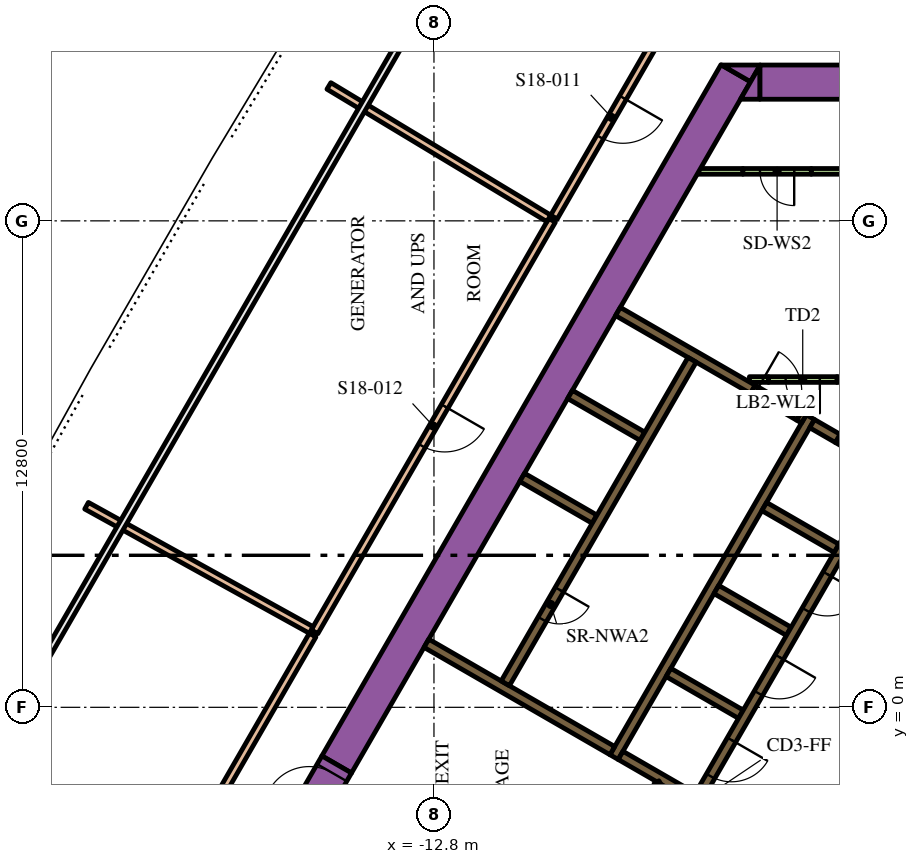
"""IFC4 building model, lengths in metres.
Left out: names, types, materials, properties, quantities, classifications, styles, units other than length and angle.
Written with IfcOpenShell. Run it as: python <this file> out.ifc"""

import sys

from ifc_helpers import new_model, si_unit, direction, frame, frame_2d, origin, place, context, subcontext, project, spatial, polyline, rectangle, outline, extrude, element, fill, save


model = new_model("IFC4")
c1 = context("Model", 3, precision=1e-05, world=origin(), true_north=direction((0.0, 1.0)))
c2 = subcontext(c1, "Body", "Model", "MODEL_VIEW")
j1 = project(units=[si_unit("LENGTHUNIT", "METRE"), si_unit("PLANEANGLEUNIT", "RADIAN")], contexts=[c1])
p1 = place(None, origin())
s1 = spatial("IfcSite", under=j1, at=p1, CompositionType="ELEMENT")
p2 = place(p1, origin())
s2 = spatial("IfcBuilding", under=s1, at=p2, CompositionType="ELEMENT")
p3 = place(p2, frame((0.0, 0.0, 78.3)))
s3 = spatial("IfcBuildingStorey", under=s2, at=p3, CompositionType="ELEMENT", Elevation=78.3)
p4 = place(p3, frame((-15.36, -1.503, 0.0), z_axis=(0.0, 0.0, 1.0), x_axis=(0.50000389221, 0.866023156604, 0.0)))
e1 = element("IfcWall", 1, at=p4, inside=s3, PredefinedType="SOLIDWALL", context=c2, shape_type="SweptSolid", body=[
    extrude(rectangle(XDim=21.0, YDim=0.9, at=frame_2d((10.5, 0.0))), origin(), (0.0, 0.0, 1.0), 5.4),
])
p5 = place(p3, origin())
e2 = element("IfcWall", 2, at=p5, inside=s3, PredefinedType="SOLIDWALL", context=c2, shape_type="SweptSolid", body=[
    extrude(outline(polyline([(-4.215, 16.9), (-4.469, 16.46), (-5.231, 16.9), (-4.215, 16.9)])), origin(), (0.0, 0.0, 1.0), 5.4),
])
p6 = place(p3, frame((-4.224, 16.45, 0.0), z_axis=(0.0, 0.0, 1.0), x_axis=(1.0, 0.0, 0.0)))
e3 = element("IfcWall", 3, at=p6, inside=s3, PredefinedType="SOLIDWALL", context=c2, shape_type="SweptSolid", body=[
    extrude(rectangle(XDim=9.488, YDim=0.9, at=frame_2d((4.744, 0.0))), origin(), (0.0, 0.0, 1.0), 5.4),
])
e4 = element("IfcWall", 4, at=p5, inside=s3, PredefinedType="SOLIDWALL", context=c2, shape_type="SweptSolid", body=[
    extrude(outline(polyline([(-4.734, 16.0), (-4.226, 16.88), (-4.226, 16.0), (-4.734, 16.0)])), origin(), (0.0, 0.0, 1.0), 5.4),
])
p7 = place(p3, frame((-8.06, -1.311, 0.0), z_axis=(0.0, 0.0, 1.0), x_axis=(0.50000273126, 0.866023826885, 0.0)))
e5 = element("IfcWall", 5, at=p7, inside=s3, PredefinedType="SOLIDWALL", context=c2, shape_type="SweptSolid", body=[
    extrude(rectangle(XDim=10.33, YDim=0.25, at=frame_2d((5.165, 0.0))), origin(), (0.0, 0.0, 1.0), 5.4),
])
p8 = place(p3, frame((-1.819, 6.87, 0.0), z_axis=(0.0, 0.0, 1.0), x_axis=(-0.866294599386, 0.499533449405, 0.0)))
e6 = element("IfcWall", 6, at=p8, inside=s3, PredefinedType="SOLIDWALL", context=c2, shape_type="SweptSolid", body=[
    extrude(rectangle(XDim=0.41, YDim=0.25, at=frame_2d((0.205, 0.0))), origin(), (0.0, 0.0, 1.0), 5.4),
])
p9 = place(p3, frame((-2.849, 7.465, 0.0), z_axis=(0.0, 0.0, 1.0), x_axis=(0.865955664968, -0.500120771724, 0.0)))
e7 = element("IfcWall", 7, at=p9, inside=s3, PredefinedType="SOLIDWALL", context=c2, shape_type="SweptSolid", body=[
    extrude(rectangle(XDim=0.778, YDim=0.25, at=frame_2d((0.389, 0.0))), origin(), (0.0, 0.0, 1.0), 5.4),
])
for number, where, z_axis, x_axis in (
    (8, (-2.204, 4.182, 0.0), (0.0, 0.0, 1.0), (-0.866, 0.5, 0.0)),
    (9, (-5.369, 3.1, 0.0), (0.0, 0.0, 1.0), (0.866, -0.5, 0.0)),
    (10, (-4.724, -0.182, 0.0), (0.0, 0.0, 1.0), (-0.866, 0.5, 0.0)),
):
    element("IfcWall", number, at=place(p3, frame(where, z_axis=z_axis, x_axis=x_axis)), inside=s3, PredefinedType="SOLIDWALL", context=c2, shape_type="SweptSolid", body=[
        extrude(rectangle(XDim=2.2, YDim=0.25, at=frame_2d((1.1, 0.0))), origin(), (0.0, 0.0, 1.0), 5.4),
    ])
e11 = element("IfcWall", 11, at=p5, inside=s3, PredefinedType="SOLIDWALL", context=c2, shape_type="SweptSolid", body=[
    extrude(outline(polyline([(-5.922, -2.257), (-5.922, -2.257), (-5.705, -2.382), (-5.83, -2.598), (-6.829, -2.021), (-6.88, -1.934), (-6.88, -1.934), (-6.93, -1.963), (-7.952, -1.373), (-7.827, -1.156), (-5.922, -2.257)])), origin(), (0.0, 0.0, 1.0), 5.4),
])
p10 = place(p3, frame((-8.106, -1.14, 0.0), z_axis=(0.0, 0.0, 1.0), x_axis=(-0.866000643155, 0.500042884217, 0.0)))
e12 = element("IfcWall", 12, at=p10, inside=s3, PredefinedType="SOLIDWALL", context=c2, shape_type="SweptSolid", body=[
    extrude(rectangle(XDim=5.65, YDim=0.25, at=frame_2d((2.825, 0.0))), origin(), (0.0, 0.0, 1.0), 5.4),
])
e13 = element("IfcWall", 13, at=p5, inside=s3, PredefinedType="SOLIDWALL", context=c2, shape_type="SweptSolid", body=[
    extrude(outline(polyline([(-3.128, 7.481), (-3.259, 7.557), (-3.134, 7.773), (-3.003, 7.698), (-3.128, 7.481)])), origin(), (0.0, 0.0, 1.0), 5.4),
])
for number, where, z_axis, x_axis in (
    (14, (-8.574, 4.95, 0.0), (0.0, 0.0, 1.0), (-0.866, 0.5, 0.0)),
    (15, (-7.314, 7.132, 0.0), (0.0, 0.0, 1.0), (-0.866, 0.5, 0.0)),
):
    element("IfcWall", number, at=place(p3, frame(where, z_axis=z_axis, x_axis=x_axis)), inside=s3, PredefinedType="SOLIDWALL", context=c2, shape_type="SweptSolid", body=[
        extrude(rectangle(XDim=2.2, YDim=0.25, at=frame_2d((1.1, 0.0))), origin(), (0.0, 0.0, 1.0), 5.4),
    ])
p11 = place(p3, frame((-7.959, 10.415, 0.0), z_axis=(0.0, 0.0, 1.0), x_axis=(0.866020958405, -0.500007699544, 0.0)))
e16 = element("IfcWall", 16, at=p11, inside=s3, PredefinedType="SOLIDWALL", context=c2, shape_type="SweptSolid", body=[
    extrude(rectangle(XDim=4.1, YDim=0.25, at=frame_2d((2.05, 0.0))), origin(), (0.0, 0.0, 1.0), 5.4),
])
p12 = place(p3, frame((-3.997, 8.625, 0.0), z_axis=(0.0, 0.0, 1.0), x_axis=(-1.0, 0.0, 0.0)))
e17 = element("IfcWall", 17, at=p12, inside=s3, PredefinedType="PARTITIONING", context=c2, shape_type="SweptSolid", body=[
    extrude(rectangle(XDim=0.502, YDim=0.15, at=frame_2d((0.251, 0.0))), origin(), (0.0, 0.0, 1.0), 4.25),
])
p13 = place(p3, frame((-5.851, 14.102, 0.0), z_axis=(0.0, 0.0, 1.0), x_axis=(1.0, 0.0, 0.0)))
e18 = element("IfcWall", 18, at=p13, inside=s3, PredefinedType="PARTITIONING", context=c2, shape_type="SweptSolid", body=[
    extrude(rectangle(XDim=1.18, YDim=0.15, at=frame_2d((0.59, 0.0))), origin(), (0.0, 0.0, 1.0), 4.25),
])
p14 = place(p3, frame((-2.871, 14.102, 0.0), z_axis=(0.0, 0.0, 1.0), x_axis=(1.0, 0.0, 0.0)))
e19 = element("IfcWall", 19, at=p14, inside=s3, PredefinedType="PARTITIONING", context=c2, shape_type="SweptSolid", body=[
    extrude(rectangle(XDim=1.196, YDim=0.15, at=frame_2d((0.598, 0.0))), origin(), (0.0, 0.0, 1.0), 4.25),
])
p15 = place(p3, frame((-2.196, 8.625, 0.0), z_axis=(0.0, 0.0, 1.0), x_axis=(1.0, 0.0, 0.0)))
e20 = element("IfcWall", 20, at=p15, inside=s3, PredefinedType="PARTITIONING", context=c2, shape_type="SweptSolid", body=[
    extrude(rectangle(XDim=1.146, YDim=0.15, at=frame_2d((0.573, 0.0))), origin(), (0.0, 0.0, 1.0), 4.25),
])
p16 = place(p3, frame((-6.008, 9.144, 0.0), z_axis=(0.0, 0.0, 1.0), x_axis=(-0.500006956611, -0.866021387346, 0.0)))
e21 = element("IfcWall", 21, at=p16, inside=s3, PredefinedType="SOLIDWALL", context=c2, shape_type="SweptSolid", body=[
    extrude(rectangle(XDim=9.83, YDim=0.25, at=frame_2d((4.915, 0.0))), origin(), (0.0, 0.0, 1.0), 5.4),
])
p17 = place(p16, frame((6.985, 0.0, 0.0)))
e22 = element("IfcOpeningElement", 22, at=p17, cuts=e21, PredefinedType="OPENING", context=c2, shape_type="SweptSolid", body=[
    extrude(rectangle(XDim=0.9, YDim=2.1, at=frame_2d((0.45, 1.05))), frame((0.0, 0.135, 0.0), z_axis=(0.0, -1.0, 0.0), x_axis=(1.0, 0.0, 0.0)), (0.0, 0.0, 1.0), 0.27),
])
p18 = place(p3, frame((-0.898, 6.194, 0.0), z_axis=(0.0, 0.0, 1.0), x_axis=(-0.499996202215, -0.866027596426, 0.0)))
e23 = element("IfcWall", 23, at=p18, inside=s3, PredefinedType="SOLIDWALL", context=c2, shape_type="SweptSolid", body=[
    extrude(rectangle(XDim=9.83, YDim=0.25, at=frame_2d((4.915, 0.0))), origin(), (0.0, 0.0, 1.0), 5.4),
])
p19 = place(p18, frame((0.585, 0.0, 0.0)))
e24 = element("IfcOpeningElement", 24, at=p19, cuts=e23, PredefinedType="OPENING", context=c2, shape_type="SweptSolid", body=[
    extrude(rectangle(XDim=1.1, YDim=2.1, at=frame_2d((0.55, 1.05))), frame((0.0, 0.135, 0.0), z_axis=(0.0, -1.0, 0.0), x_axis=(1.0, 0.0, 0.0)), (0.0, 0.0, 1.0), 0.27),
])
p20 = place(p18, frame((3.105, 0.0, 0.0)))
e25 = element("IfcOpeningElement", 25, at=p20, cuts=e23, PredefinedType="OPENING", context=c2, shape_type="SweptSolid", body=[
    extrude(rectangle(XDim=1.1, YDim=2.1, at=frame_2d((0.55, 1.05))), frame((0.0, 0.135, 0.0), z_axis=(0.0, -1.0, 0.0), x_axis=(1.0, 0.0, 0.0)), (0.0, 0.0, 1.0), 0.27),
])
p21 = place(p18, frame((5.625, 0.0, 0.0)))
e26 = element("IfcOpeningElement", 26, at=p21, cuts=e23, PredefinedType="OPENING", context=c2, shape_type="SweptSolid", body=[
    extrude(rectangle(XDim=1.1, YDim=2.1, at=frame_2d((0.55, 1.05))), frame((0.0, 0.135, 0.0), z_axis=(0.0, -1.0, 0.0), x_axis=(1.0, 0.0, 0.0)), (0.0, 0.0, 1.0), 0.27),
])
p22 = place(p18, frame((8.145, 0.0, 0.0)))
e27 = element("IfcOpeningElement", 27, at=p22, cuts=e23, PredefinedType="OPENING", context=c2, shape_type="SweptSolid", body=[
    extrude(rectangle(XDim=1.1, YDim=2.1, at=frame_2d((0.55, 1.05))), frame((0.0, 0.135, 0.0), z_axis=(0.0, -1.0, 0.0), x_axis=(1.0, 0.0, 0.0)), (0.0, 0.0, 1.0), 0.27),
])
p23 = place(p3, frame((-2.196, 8.625, 0.0), z_axis=(0.0, 0.0, 1.0), x_axis=(-1.0, 0.0, 0.0)))
e28 = element("IfcWall", 28, at=p23, inside=s3, PredefinedType="PARTITIONING", context=c2, shape_type="SweptSolid", body=[
    extrude(rectangle(XDim=1.8, YDim=0.15, at=frame_2d((0.9, 0.0))), origin(), (0.0, 0.0, 1.0), 4.25),
])
p24 = place(p23, frame((0.45, 0.0, 0.0)))
e29 = element("IfcOpeningElement", 29, at=p24, cuts=e28, PredefinedType="OPENING", context=c2, shape_type="SweptSolid", body=[
    extrude(rectangle(XDim=0.9, YDim=2.1, at=frame_2d((0.45, 1.05))), frame((0.0, 0.085, 0.0), z_axis=(0.0, -1.0, 0.0), x_axis=(1.0, 0.0, 0.0)), (0.0, 0.0, 1.0), 0.17),
])
p25 = place(p3, frame((-5.895, -3.79, 0.0), z_axis=(0.0, 0.0, 1.0), x_axis=(-0.49994051562, 0.866059744384, 0.0)))
e30 = element("IfcWall", 30, at=p25, inside=s3, PredefinedType="PARTITIONING", context=c2, shape_type="SweptSolid", body=[
    extrude(rectangle(XDim=2.1, YDim=0.15, at=frame_2d((1.05, 0.0))), origin(), (0.0, 0.0, 1.0), 4.25),
])
p26 = place(p25, frame((0.45, 0.0, 0.0)))
e31 = element("IfcOpeningElement", 31, at=p26, cuts=e30, PredefinedType="OPENING", context=c2, shape_type="SweptSolid", body=[
    extrude(rectangle(XDim=1.2, YDim=2.1, at=frame_2d((0.6, 1.05))), frame((0.0, 0.085, 0.0), z_axis=(0.0, -1.0, 0.0), x_axis=(1.0, 0.0, 0.0)), (0.0, 0.0, 1.0), 0.17),
])
p27 = place(p3, frame((-4.409, 8.365, 0.0), z_axis=(0.0, 0.0, 1.0), x_axis=(0.866034573852, -0.49998411664, 0.0)))
e32 = element("IfcWall", 32, at=p27, inside=s3, PredefinedType="SOLIDWALL", context=c2, shape_type="SweptSolid", body=[
    extrude(rectangle(XDim=1.4, YDim=0.25, at=frame_2d((0.7, 0.0))), origin(), (0.0, 0.0, 1.0), 5.4),
])
p28 = place(p27, frame((0.1, 0.0, 0.0)))
e33 = element("IfcOpeningElement", 33, at=p28, cuts=e32, PredefinedType="OPENING", context=c2, shape_type="SweptSolid", body=[
    extrude(rectangle(XDim=1.2, YDim=2.1, at=frame_2d((0.6, 1.05))), frame((0.0, 0.135, 0.0), z_axis=(0.0, -1.0, 0.0), x_axis=(1.0, 0.0, 0.0)), (0.0, 0.0, 1.0), 0.27),
])
p29 = place(p3, frame((-16.209, -2.976, 0.0), z_axis=(0.0, 0.0, 1.0), x_axis=(0.499954529098, 0.86605165483, 0.0)))
e34 = element("IfcWall", 34, at=p29, inside=s3, PredefinedType="SOLIDWALL", context=c2, shape_type="SweptSolid", body=[
    extrude(rectangle(XDim=1.7, YDim=0.9, at=frame_2d((0.85, 0.0))), origin(), (0.0, 0.0, 1.0), 5.4),
])
p30 = place(p29, frame((0.25, 0.0, 0.0)))
e35 = element("IfcOpeningElement", 35, at=p30, cuts=e34, PredefinedType="OPENING", context=c2, shape_type="SweptSolid", body=[
    extrude(rectangle(XDim=1.2, YDim=2.1, at=frame_2d((0.6, 1.05))), frame((0.0, 0.46, 0.0), z_axis=(0.0, -1.0, 0.0), x_axis=(1.0, 0.0, 0.0)), (0.0, 0.0, 1.0), 0.92),
])
p31 = place(p3, frame((-2.871, 14.102, 0.0), z_axis=(0.0, 0.0, 1.0), x_axis=(-1.0, 0.0, 0.0)))
e36 = element("IfcWall", 36, at=p31, inside=s3, PredefinedType="PARTITIONING", context=c2, shape_type="SweptSolid", body=[
    extrude(rectangle(XDim=1.8, YDim=0.15, at=frame_2d((0.9, 0.0))), origin(), (0.0, 0.0, 1.0), 4.25),
])
p32 = place(p31, frame((0.45, 0.0, 0.0)))
e37 = element("IfcOpeningElement", 37, at=p32, cuts=e36, PredefinedType="OPENING", context=c2, shape_type="SweptSolid", body=[
    extrude(rectangle(XDim=0.9, YDim=2.1, at=frame_2d((0.45, 1.05))), frame((0.0, 0.085, 0.0), z_axis=(0.0, -1.0, 0.0), x_axis=(1.0, 0.0, 0.0)), (0.0, 0.0, 1.0), 0.17),
])
p33 = place(p3, frame((-9.692, 12.813, 0.0), z_axis=(0.0, 0.0, 1.0), x_axis=(-0.499991245628, -0.866030458065, 0.0)))
e38 = element("IfcWall", 38, at=p33, inside=s3, PredefinedType="PARTITIONING", context=c2, shape_type="SweptSolid", body=[
    extrude(rectangle(XDim=12.501, YDim=0.2, at=frame_2d((6.25, 0.0))), origin(), (0.0, 0.0, 1.0), 4.25),
])
p34 = place(p33, frame((5.651, 0.0, 0.0)))
e39 = element("IfcOpeningElement", 39, at=p34, cuts=e38, PredefinedType="OPENING", context=c2, shape_type="SweptSolid", body=[
    extrude(rectangle(XDim=1.2, YDim=2.1, at=frame_2d((0.6, 1.05))), frame((0.0, 0.11, 0.0), z_axis=(0.0, -1.0, 0.0), x_axis=(1.0, 0.0, 0.0)), (0.0, 0.0, 1.0), 0.22),
])
p35 = place(p3, frame((-9.778, 12.865, 0.0), z_axis=(0.0, 0.0, 1.0), x_axis=(-0.856637163458, 0.515919344648, 0.0)))
e40 = element("IfcWall", 40, at=p35, inside=s3, PredefinedType="PARTITIONING", context=c2, shape_type="SweptSolid", body=[
    extrude(rectangle(XDim=6.756, YDim=0.2, at=frame_2d((3.378, 0.0))), origin(), (0.0, 0.0, 1.0), 4.25),
])
p36 = place(p3, frame((-21.942, 5.304, 0.0), z_axis=(0.0, 0.0, 1.0), x_axis=(0.875134013618, -0.483880623924, 0.0)))
e41 = element("IfcWall", 41, at=p36, inside=s3, PredefinedType="PARTITIONING", context=c2, shape_type="SweptSolid", body=[
    extrude(rectangle(XDim=6.755, YDim=0.2, at=frame_2d((3.378, 0.0))), origin(), (0.0, 0.0, 1.0), 4.25),
])
p37 = place(p3, frame((-19.341, -3.9, 0.0), z_axis=(0.0, 0.0, 1.0), x_axis=(0.500035875758, 0.866004689915, 0.0)))
e42 = element("IfcWall", 42, at=p37, inside=s3, PredefinedType="PARTITIONING", context=c2, shape_type="SweptSolid", body=[
    extrude(rectangle(XDim=6.698, YDim=0.2, at=frame_2d((3.349, 0.0))), origin(), (0.0, 0.0, 1.0), 4.25),
])
p38 = place(p3, frame((-6.615, 18.143, 0.0), z_axis=(0.0, 0.0, 1.0), x_axis=(-0.500002829465, -0.866023770186, 0.0)))
e43 = element("IfcWall", 43, at=p38, inside=s3, PredefinedType="PARTITIONING", context=c2, shape_type="SweptSolid", body=[
    extrude(rectangle(XDim=6.055, YDim=0.2, at=frame_2d((3.028, 0.0))), origin(), (0.0, 0.0, 1.0), 4.25),
])
p39 = place(p38, frame((2.427, 0.0, 0.0)))
e44 = element("IfcOpeningElement", 44, at=p39, cuts=e43, PredefinedType="OPENING", context=c2, shape_type="SweptSolid", body=[
    extrude(rectangle(XDim=1.2, YDim=2.1, at=frame_2d((0.6, 1.05))), frame((0.0, 0.11, 0.0), z_axis=(0.0, -1.0, 0.0), x_axis=(1.0, 0.0, 0.0)), (0.0, 0.0, 1.0), 0.22),
])
p40 = place(p17, origin())
e45 = element("IfcDoor", 45, at=p40, inside=s3, OperationType="SINGLE_SWING_LEFT", PredefinedType="DOOR", context=c2, shape_type="SweptSolid", body=[
    extrude(rectangle(XDim=0.9, YDim=2.1, at=frame_2d((0.45, 1.05))), frame((0.0, 0.025, 0.0), z_axis=(0.0, -1.0, 0.0), x_axis=(1.0, 0.0, 0.0)), (0.0, 0.0, 1.0), 0.05),
])
fill(e22, e45)
p41 = place(p20, origin())
e46 = element("IfcDoor", 46, at=p41, inside=s3, OperationType="DOUBLE_DOOR_SLIDING", PredefinedType="DOOR", context=c2, shape_type="SweptSolid", body=[
    extrude(rectangle(XDim=1.1, YDim=2.1, at=frame_2d((0.55, 1.05))), frame((0.0, 0.025, 0.0), z_axis=(0.0, -1.0, 0.0), x_axis=(1.0, 0.0, 0.0)), (0.0, 0.0, 1.0), 0.05),
])
fill(e25, e46)
p42 = place(p21, origin())
e47 = element("IfcDoor", 47, at=p42, inside=s3, OperationType="DOUBLE_DOOR_SLIDING", PredefinedType="DOOR", context=c2, shape_type="SweptSolid", body=[
    extrude(rectangle(XDim=1.1, YDim=2.1, at=frame_2d((0.55, 1.05))), frame((0.0, 0.025, 0.0), z_axis=(0.0, -1.0, 0.0), x_axis=(1.0, 0.0, 0.0)), (0.0, 0.0, 1.0), 0.05),
])
fill(e26, e47)
p43 = place(p22, origin())
e48 = element("IfcDoor", 48, at=p43, inside=s3, OperationType="DOUBLE_DOOR_SLIDING", PredefinedType="DOOR", context=c2, shape_type="SweptSolid", body=[
    extrude(rectangle(XDim=1.1, YDim=2.1, at=frame_2d((0.55, 1.05))), frame((0.0, 0.025, 0.0), z_axis=(0.0, -1.0, 0.0), x_axis=(1.0, 0.0, 0.0)), (0.0, 0.0, 1.0), 0.05),
])
fill(e27, e48)
p44 = place(p24, origin())
e49 = element("IfcDoor", 49, at=p44, inside=s3, OperationType="SINGLE_SWING_LEFT", PredefinedType="DOOR", context=c2, shape_type="SweptSolid", body=[
    extrude(rectangle(XDim=0.9, YDim=2.1, at=frame_2d((0.45, 1.05))), frame((0.0, 0.025, 0.0), z_axis=(0.0, -1.0, 0.0), x_axis=(1.0, 0.0, 0.0)), (0.0, 0.0, 1.0), 0.05),
])
fill(e29, e49)
p45 = place(p28, origin())
e50 = element("IfcDoor", 50, at=p45, inside=s3, OperationType="SINGLE_SWING_LEFT", PredefinedType="DOOR", context=c2, shape_type="SweptSolid", body=[
    extrude(rectangle(XDim=1.2, YDim=2.1, at=frame_2d((0.6, 1.05))), frame((0.0, 0.025, 0.0), z_axis=(0.0, -1.0, 0.0), x_axis=(1.0, 0.0, 0.0)), (0.0, 0.0, 1.0), 0.05),
])
fill(e33, e50)
p46 = place(p30, origin())
e51 = element("IfcDoor", 51, at=p46, inside=s3, OperationType="SINGLE_SWING_LEFT", PredefinedType="DOOR", context=c2, shape_type="SweptSolid", body=[
    extrude(rectangle(XDim=1.2, YDim=2.1, at=frame_2d((0.6, 1.05))), frame((0.0, 0.025, 0.0), z_axis=(0.0, -1.0, 0.0), x_axis=(1.0, 0.0, 0.0)), (0.0, 0.0, 1.0), 0.05),
])
fill(e35, e51)
p47 = place(p32, origin())
e52 = element("IfcDoor", 52, at=p47, inside=s3, OperationType="SINGLE_SWING_LEFT", PredefinedType="DOOR", context=c2, shape_type="SweptSolid", body=[
    extrude(rectangle(XDim=0.9, YDim=2.1, at=frame_2d((0.45, 1.05))), frame((0.0, 0.025, 0.0), z_axis=(0.0, -1.0, 0.0), x_axis=(1.0, 0.0, 0.0)), (0.0, 0.0, 1.0), 0.05),
])
fill(e37, e52)
p48 = place(p39, origin())
e53 = element("IfcDoor", 53, at=p48, inside=s3, OperationType="SINGLE_SWING_RIGHT", PredefinedType="DOOR", context=c2, shape_type="SweptSolid", body=[
    extrude(rectangle(XDim=1.2, YDim=2.1, at=frame_2d((0.6, 1.05))), frame((0.0, 0.025, 0.0), z_axis=(0.0, -1.0, 0.0), x_axis=(1.0, 0.0, 0.0)), (0.0, 0.0, 1.0), 0.05),
])
fill(e44, e53)
p49 = place(p34, origin())
e54 = element("IfcDoor", 54, at=p49, inside=s3, OperationType="SINGLE_SWING_RIGHT", PredefinedType="DOOR", context=c2, shape_type="SweptSolid", body=[
    extrude(rectangle(XDim=1.2, YDim=2.1, at=frame_2d((0.6, 1.05))), frame((0.0, 0.025, 0.0), z_axis=(0.0, -1.0, 0.0), x_axis=(1.0, 0.0, 0.0)), (0.0, 0.0, 1.0), 0.05),
])
fill(e39, e54)
save(model, sys.argv[1])
